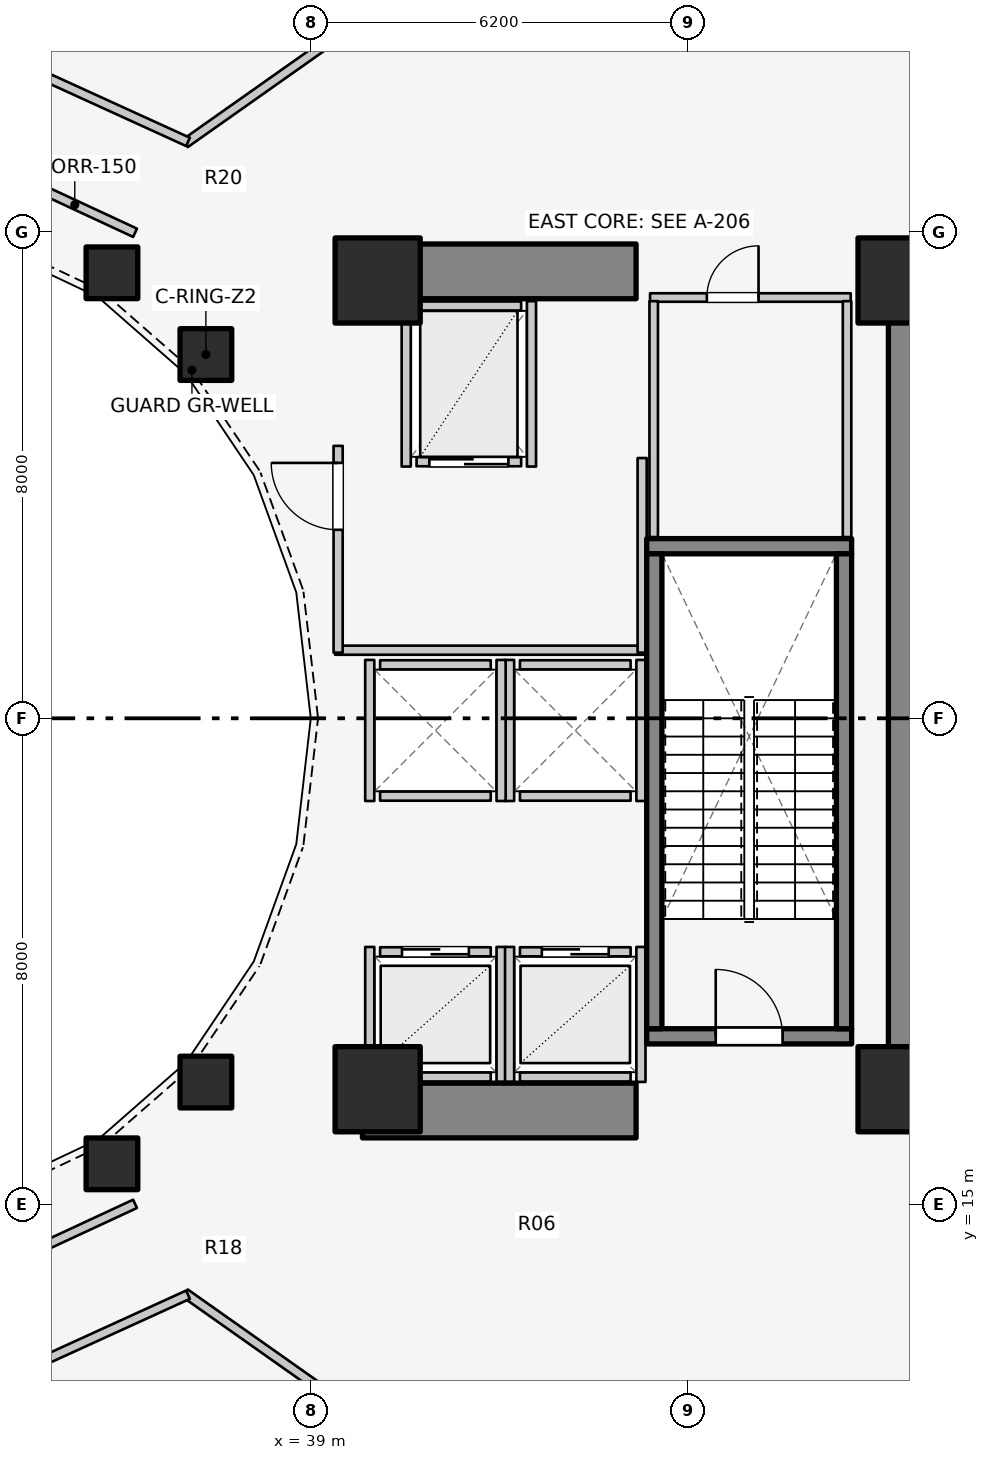
"""IFC4 building model, lengths in metres.
Left out: names, types, materials, properties, quantities, classifications, styles, units other than length and angle.
Written with IfcOpenShell. Run it as: python <this file> out.ifc"""

import sys

from ifc_helpers import new_model, si_unit, direction, frame, frame_2d, origin, origin_2d, place, context, subcontext, project, spatial, rectangle, extrude, element, fill, save


model = new_model("IFC4")
c1 = context("Model", 3, precision=1e-05, world=origin(), true_north=direction((0.0, 1.0)))
c2 = subcontext(c1, "Body", "Model", "MODEL_VIEW")
j1 = project(units=[si_unit("LENGTHUNIT", "METRE"), si_unit("PLANEANGLEUNIT", "RADIAN")], contexts=[c1])
p1 = place(None, origin())
s1 = spatial("IfcSite", under=j1, at=p1, CompositionType="ELEMENT")
p2 = place(p1, origin())
s2 = spatial("IfcBuilding", under=s1, at=p2, CompositionType="ELEMENT")
p3 = place(p2, frame((0.0, 0.0, 69.0)))
s3 = spatial("IfcBuildingStorey", under=s2, at=p3, CompositionType="ELEMENT", Elevation=69.0)
p4 = place(p3, frame((48.95, 17.05, 0.0), z_axis=(0.0, 0.0, 1.0), x_axis=(0.0, 1.0, 0.0)))
e1 = element("IfcWall", 1, at=p4, inside=s3, PredefinedType="SHEAR", context=c2, shape_type="SweptSolid", body=[
    extrude(rectangle(XDim=12.8, YDim=0.9, at=frame_2d((6.4, 0.0))), origin(), (0.0, 0.0, 1.0), 4.2),
])
for number, where, z_axis, x_axis in (
    (2, (39.85, 16.55, 0.0), (0.0, 0.0, 1.0), (1.0, 0.0, 0.0)),
    (3, (39.85, 30.35, 0.0), (0.0, 0.0, 1.0), (1.0, 0.0, 0.0)),
):
    element("IfcWall", number, at=place(p3, frame(where, z_axis=z_axis, x_axis=x_axis)), inside=s3, PredefinedType="SHEAR", context=c2, shape_type="SweptSolid", body=[
        extrude(rectangle(XDim=4.5, YDim=0.9, at=frame_2d((2.25, 0.0))), origin(), (0.0, 0.0, 1.0), 4.2),
    ])
p5 = place(p3, frame((44.525, 17.77, 0.0), z_axis=(0.0, 0.0, 1.0), x_axis=(1.0, 0.0, 0.0)))
e4 = element("IfcWall", 4, at=p5, inside=s3, PredefinedType="SOLIDWALL", context=c2, shape_type="SweptSolid", body=[
    extrude(rectangle(XDim=3.37, YDim=0.25, at=frame_2d((1.685, 0.0))), origin(), (0.0, 0.0, 1.0), 4.2),
])
p6 = place(p5, frame((1.135, 0.0, 0.0)))
e5 = element("IfcOpeningElement", 5, at=p6, cuts=e4, PredefinedType="OPENING", context=c2, shape_type="SweptSolid", body=[
    extrude(rectangle(XDim=1.1, YDim=2.1, at=frame_2d((0.55, 1.05))), frame((0.0, 0.135, 0.0), z_axis=(0.0, -1.0, 0.0), x_axis=(1.0, 0.0, 0.0)), (0.0, 0.0, 1.0), 0.27),
])
p7 = place(p3, frame((44.525, 25.83, 0.0), z_axis=(0.0, 0.0, 1.0), x_axis=(1.0, 0.0, 0.0)))
e6 = element("IfcWall", 6, at=p7, inside=s3, PredefinedType="SOLIDWALL", context=c2, shape_type="SweptSolid", body=[
    extrude(rectangle(XDim=3.37, YDim=0.25, at=frame_2d((1.685, 0.0))), origin(), (0.0, 0.0, 1.0), 4.2),
])
for number, where, z_axis, x_axis in (
    (7, (44.65, 17.895, 0.0), (0.0, 0.0, 1.0), (0.0, 1.0, 0.0)),
    (8, (47.77, 17.895, 0.0), (0.0, 0.0, 1.0), (0.0, 1.0, 0.0)),
):
    element("IfcWall", number, at=place(p3, frame(where, z_axis=z_axis, x_axis=x_axis)), inside=s3, PredefinedType="SOLIDWALL", context=c2, shape_type="SweptSolid", body=[
        extrude(rectangle(XDim=7.81, YDim=0.25, at=frame_2d((3.905, 0.0))), origin(), (0.0, 0.0, 1.0), 4.2),
    ])
for number, where, z_axis, x_axis in (
    (9, (40.1, 16.9, 0.0), (0.0, 0.0, 1.0), (1.0, 0.0, 0.0)),
    (10, (48.7, 16.9, 0.0), (0.0, 0.0, 1.0), (1.0, 0.0, 0.0)),
    (11, (48.7, 30.2, 0.0), (0.0, 0.0, 1.0), (1.0, 0.0, 0.0)),
    (12, (40.1, 30.2, 0.0), (0.0, 0.0, 1.0), (1.0, 0.0, 0.0)),
):
    element("IfcColumn", number, at=place(p3, frame(where, z_axis=z_axis, x_axis=x_axis)), inside=s3, PredefinedType="COLUMN", context=c2, shape_type="SweptSolid", body=[
        extrude(rectangle(XDim=1.4, YDim=1.4, at=origin_2d()), origin(), (0.0, 0.0, 1.0), 4.2),
    ])
for number, where, z_axis, x_axis in (
    (13, (37.275, 28.982, 0.0), (0.0, 0.0, 1.0), (1.0, 0.0, 0.0)),
    (14, (35.73, 30.327, 0.0), (0.0, 0.0, 1.0), (1.0, 0.0, 0.0)),
    (15, (35.73, 15.673, 0.0), (0.0, 0.0, 1.0), (1.0, 0.0, 0.0)),
    (16, (37.275, 17.018, 0.0), (0.0, 0.0, 1.0), (1.0, 0.0, 0.0)),
):
    element("IfcColumn", number, at=place(p3, frame(where, z_axis=z_axis, x_axis=x_axis)), inside=s3, PredefinedType="COLUMN", context=c2, shape_type="SweptSolid", body=[
        extrude(rectangle(XDim=0.85, YDim=0.85, at=origin_2d()), origin(), (0.0, 0.0, 1.0), 4.2),
    ])
p8 = place(p3, frame((40.14, 19.16, 0.0), z_axis=(0.0, 0.0, 1.0), x_axis=(1.0, 0.0, 0.0)))
e17 = element("IfcWall", 17, at=p8, inside=s3, PredefinedType="SOLIDWALL", context=c2, shape_type="SweptSolid", body=[
    extrude(rectangle(XDim=1.82, YDim=0.15, at=frame_2d((0.91, 0.0))), origin(), (0.0, 0.0, 1.0), 3.22),
])
p9 = place(p8, frame((0.36, 0.0, 0.0)))
e18 = element("IfcOpeningElement", 18, at=p9, cuts=e17, PredefinedType="OPENING", context=c2, shape_type="SweptSolid", body=[
    extrude(rectangle(XDim=1.1, YDim=2.1, at=frame_2d((0.55, 1.05))), frame((0.0, 0.085, 0.0), z_axis=(0.0, -1.0, 0.0), x_axis=(1.0, 0.0, 0.0)), (0.0, 0.0, 1.0), 0.17),
])
p10 = place(p3, frame((40.14, 17.1, 0.0), z_axis=(0.0, 0.0, 1.0), x_axis=(1.0, 0.0, 0.0)))
e19 = element("IfcWall", 19, at=p10, inside=s3, PredefinedType="SOLIDWALL", context=c2, shape_type="SweptSolid", body=[
    extrude(rectangle(XDim=1.82, YDim=0.15, at=frame_2d((0.91, 0.0))), origin(), (0.0, 0.0, 1.0), 3.22),
])
p11 = place(p3, frame((39.97, 17.02, 0.0), z_axis=(0.0, 0.0, 1.0), x_axis=(0.0, 1.0, 0.0)))
e20 = element("IfcWall", 20, at=p11, inside=s3, PredefinedType="SOLIDWALL", context=c2, shape_type="SweptSolid", body=[
    extrude(rectangle(XDim=2.22, YDim=0.15, at=frame_2d((1.11, 0.0))), origin(), (0.0, 0.0, 1.0), 2.973),
])
p12 = place(p3, frame((42.13, 17.02, 0.0), z_axis=(0.0, 0.0, 1.0), x_axis=(0.0, 1.0, 0.0)))
e21 = element("IfcWall", 21, at=p12, inside=s3, PredefinedType="SOLIDWALL", context=c2, shape_type="SweptSolid", body=[
    extrude(rectangle(XDim=2.22, YDim=0.15, at=frame_2d((1.11, 0.0))), origin(), (0.0, 0.0, 1.0), 3.675),
])
p13 = place(p3, frame((42.44, 19.16, 0.0), z_axis=(0.0, 0.0, 1.0), x_axis=(1.0, 0.0, 0.0)))
e22 = element("IfcWall", 22, at=p13, inside=s3, PredefinedType="SOLIDWALL", context=c2, shape_type="SweptSolid", body=[
    extrude(rectangle(XDim=1.82, YDim=0.15, at=frame_2d((0.91, 0.0))), origin(), (0.0, 0.0, 1.0), 3.675),
])
p14 = place(p13, frame((0.36, 0.0, 0.0)))
e23 = element("IfcOpeningElement", 23, at=p14, cuts=e22, PredefinedType="OPENING", context=c2, shape_type="SweptSolid", body=[
    extrude(rectangle(XDim=1.1, YDim=2.1, at=frame_2d((0.55, 1.05))), frame((0.0, 0.085, 0.0), z_axis=(0.0, -1.0, 0.0), x_axis=(1.0, 0.0, 0.0)), (0.0, 0.0, 1.0), 0.17),
])
p15 = place(p3, frame((42.44, 17.1, 0.0), z_axis=(0.0, 0.0, 1.0), x_axis=(1.0, 0.0, 0.0)))
e24 = element("IfcWall", 24, at=p15, inside=s3, PredefinedType="SOLIDWALL", context=c2, shape_type="SweptSolid", body=[
    extrude(rectangle(XDim=1.82, YDim=0.15, at=frame_2d((0.91, 0.0))), origin(), (0.0, 0.0, 1.0), 3.675),
])
p16 = place(p3, frame((42.27, 17.02, 0.0), z_axis=(0.0, 0.0, 1.0), x_axis=(0.0, 1.0, 0.0)))
e25 = element("IfcWall", 25, at=p16, inside=s3, PredefinedType="SOLIDWALL", context=c2, shape_type="SweptSolid", body=[
    extrude(rectangle(XDim=2.22, YDim=0.15, at=frame_2d((1.11, 0.0))), origin(), (0.0, 0.0, 1.0), 3.675),
])
p17 = place(p3, frame((44.43, 17.02, 0.0), z_axis=(0.0, 0.0, 1.0), x_axis=(0.0, 1.0, 0.0)))
e26 = element("IfcWall", 26, at=p17, inside=s3, PredefinedType="SOLIDWALL", context=c2, shape_type="SweptSolid", body=[
    extrude(rectangle(XDim=2.22, YDim=0.15, at=frame_2d((1.11, 0.0))), origin(), (0.0, 0.0, 1.0), 3.22),
])
for number, where, z_axis, x_axis in (
    (27, (42.44, 21.72, 0.0), (0.0, 0.0, 1.0), (1.0, 0.0, 0.0)),
    (28, (42.44, 23.88, 0.0), (0.0, 0.0, 1.0), (1.0, 0.0, 0.0)),
):
    element("IfcWall", number, at=place(p3, frame(where, z_axis=z_axis, x_axis=x_axis)), inside=s3, PredefinedType="SOLIDWALL", context=c2, shape_type="SweptSolid", body=[
        extrude(rectangle(XDim=1.82, YDim=0.15, at=frame_2d((0.91, 0.0))), origin(), (0.0, 0.0, 1.0), 3.675),
    ])
for number, where, z_axis, x_axis in (
    (29, (42.27, 21.64, 0.0), (0.0, 0.0, 1.0), (0.0, 1.0, 0.0)),
    (30, (44.43, 21.64, 0.0), (0.0, 0.0, 1.0), (0.0, 1.0, 0.0)),
):
    element("IfcWall", number, at=place(p3, frame(where, z_axis=z_axis, x_axis=x_axis)), inside=s3, PredefinedType="SOLIDWALL", context=c2, shape_type="SweptSolid", body=[
        extrude(rectangle(XDim=2.32, YDim=0.15, at=frame_2d((1.16, 0.0))), origin(), (0.0, 0.0, 1.0), 3.675),
    ])
for number, where, z_axis, x_axis in (
    (31, (40.14, 21.72, 0.0), (0.0, 0.0, 1.0), (1.0, 0.0, 0.0)),
    (32, (40.14, 23.88, 0.0), (0.0, 0.0, 1.0), (1.0, 0.0, 0.0)),
):
    element("IfcWall", number, at=place(p3, frame(where, z_axis=z_axis, x_axis=x_axis)), inside=s3, PredefinedType="SOLIDWALL", context=c2, shape_type="SweptSolid", body=[
        extrude(rectangle(XDim=1.82, YDim=0.15, at=frame_2d((0.91, 0.0))), origin(), (0.0, 0.0, 1.0), 3.22),
    ])
p18 = place(p3, frame((39.97, 21.64, 0.0), z_axis=(0.0, 0.0, 1.0), x_axis=(0.0, 1.0, 0.0)))
e33 = element("IfcWall", 33, at=p18, inside=s3, PredefinedType="SOLIDWALL", context=c2, shape_type="SweptSolid", body=[
    extrude(rectangle(XDim=2.32, YDim=0.15, at=frame_2d((1.16, 0.0))), origin(), (0.0, 0.0, 1.0), 3.22),
])
p19 = place(p3, frame((42.13, 21.64, 0.0), z_axis=(0.0, 0.0, 1.0), x_axis=(0.0, 1.0, 0.0)))
e34 = element("IfcWall", 34, at=p19, inside=s3, PredefinedType="SOLIDWALL", context=c2, shape_type="SweptSolid", body=[
    extrude(rectangle(XDim=2.32, YDim=0.15, at=frame_2d((1.16, 0.0))), origin(), (0.0, 0.0, 1.0), 3.675),
])
p20 = place(p3, frame((40.74, 27.22, 0.0), z_axis=(0.0, 0.0, 1.0), x_axis=(1.0, 0.0, 0.0)))
e35 = element("IfcWall", 35, at=p20, inside=s3, PredefinedType="SOLIDWALL", context=c2, shape_type="SweptSolid", body=[
    extrude(rectangle(XDim=1.72, YDim=0.15, at=frame_2d((0.86, 0.0))), origin(), (0.0, 0.0, 1.0), 3.675),
])
p21 = place(p20, frame((0.21, 0.0, 0.0)))
e36 = element("IfcOpeningElement", 36, at=p21, cuts=e35, PredefinedType="OPENING", context=c2, shape_type="SweptSolid", body=[
    extrude(rectangle(XDim=1.3, YDim=2.1, at=frame_2d((0.65, 1.05))), frame((0.0, 0.085, 0.0), z_axis=(0.0, -1.0, 0.0), x_axis=(1.0, 0.0, 0.0)), (0.0, 0.0, 1.0), 0.17),
])
p22 = place(p3, frame((40.74, 29.78, 0.0), z_axis=(0.0, 0.0, 1.0), x_axis=(1.0, 0.0, 0.0)))
e37 = element("IfcWall", 37, at=p22, inside=s3, PredefinedType="SOLIDWALL", context=c2, shape_type="SweptSolid", body=[
    extrude(rectangle(XDim=1.72, YDim=0.15, at=frame_2d((0.86, 0.0))), origin(), (0.0, 0.0, 1.0), 3.675),
])
for number, where, z_axis, x_axis in (
    (38, (40.57, 27.14, 0.0), (0.0, 0.0, 1.0), (0.0, 1.0, 0.0)),
    (39, (42.63, 27.14, 0.0), (0.0, 0.0, 1.0), (0.0, 1.0, 0.0)),
):
    element("IfcWall", number, at=place(p3, frame(where, z_axis=z_axis, x_axis=x_axis)), inside=s3, PredefinedType="SOLIDWALL", context=c2, shape_type="SweptSolid", body=[
        extrude(rectangle(XDim=2.72, YDim=0.15, at=frame_2d((1.36, 0.0))), origin(), (0.0, 0.0, 1.0), 3.675),
    ])
p23 = place(p3, frame((39.4, 24.12, 0.0), z_axis=(0.0, 0.0, 1.0), x_axis=(1.0, 0.0, 0.0)))
e40 = element("IfcWall", 40, at=p23, inside=s3, PredefinedType="PARTITIONING", context=c2, shape_type="SweptSolid", body=[
    extrude(rectangle(XDim=5.08, YDim=0.15, at=frame_2d((2.54, 0.0))), origin(), (0.0, 0.0, 1.0), 3.22),
])
p24 = place(p3, frame((44.45, 24.08, 0.0), z_axis=(0.0, 0.0, 1.0), x_axis=(0.0, 1.0, 0.0)))
e41 = element("IfcWall", 41, at=p24, inside=s3, PredefinedType="PARTITIONING", context=c2, shape_type="SweptSolid", body=[
    extrude(rectangle(XDim=3.2, YDim=0.15, at=frame_2d((1.6, 0.0))), origin(), (0.0, 0.0, 1.0), 3.675),
])
p25 = place(p3, frame((39.45, 24.08, 0.0), z_axis=(0.0, 0.0, 1.0), x_axis=(0.0, 1.0, 0.0)))
e42 = element("IfcWall", 42, at=p25, inside=s3, PredefinedType="PARTITIONING", context=c2, shape_type="SweptSolid", body=[
    extrude(rectangle(XDim=3.4, YDim=0.15, at=frame_2d((1.7, 0.0))), origin(), (0.0, 0.0, 1.0), 3.675),
])
p26 = place(p25, frame((2.02, 0.0, 0.0)))
e43 = element("IfcOpeningElement", 43, at=p26, cuts=e42, PredefinedType="OPENING", context=c2, shape_type="SweptSolid", body=[
    extrude(rectangle(XDim=1.1, YDim=2.1, at=frame_2d((0.55, 1.05))), frame((0.0, 0.085, 0.0), z_axis=(0.0, -1.0, 0.0), x_axis=(1.0, 0.0, 0.0)), (0.0, 0.0, 1.0), 0.17),
])
for number, where, z_axis, x_axis in (
    (44, (36.11, 30.985, 0.0), (0.0, 0.0, 1.0), (-0.907, 0.421, 0.0)),
    (45, (34.127, 14.094, 0.0), (0.0, 0.0, 1.0), (0.907, 0.421, 0.0)),
):
    element("IfcWall", number, at=place(p3, frame(where, z_axis=z_axis, x_axis=x_axis)), inside=s3, PredefinedType="PARTITIONING", context=c2, shape_type="SweptSolid", body=[
        extrude(rectangle(XDim=2.186, YDim=0.15, at=frame_2d((1.093, 0.0))), origin(), (0.0, 0.0, 1.0), 2.32),
    ])
p27 = place(p3, frame((36.934, 32.454, 0.0), z_axis=(0.0, 0.0, 1.0), x_axis=(0.817064271391, 0.576546595182, 0.0)))
e46 = element("IfcWall", 46, at=p27, inside=s3, PredefinedType="PARTITIONING", context=c2, shape_type="SweptSolid", body=[
    extrude(rectangle(XDim=9.614, YDim=0.15, at=frame_2d((4.807, 0.0))), origin(), (0.0, 0.0, 1.0), 2.32),
])
p28 = place(p3, frame((36.981, 32.479, 0.0), z_axis=(0.0, 0.0, 1.0), x_axis=(-0.909819048293, 0.415005179923, 0.0)))
e47 = element("IfcWall", 47, at=p28, inside=s3, PredefinedType="PARTITIONING", context=c2, shape_type="SweptSolid", body=[
    extrude(rectangle(XDim=2.646, YDim=0.15, at=frame_2d((1.323, 0.0))), origin(), (0.0, 0.0, 1.0), 2.32),
])
p29 = place(p3, frame((36.934, 13.546, 0.0), z_axis=(0.0, 0.0, 1.0), x_axis=(0.817064271391, -0.576546595182, 0.0)))
e48 = element("IfcWall", 48, at=p29, inside=s3, PredefinedType="PARTITIONING", context=c2, shape_type="SweptSolid", body=[
    extrude(rectangle(XDim=9.614, YDim=0.15, at=frame_2d((4.807, 0.0))), origin(), (0.0, 0.0, 1.0), 2.32),
])
p30 = place(p3, frame((34.573, 12.423, 0.0), z_axis=(0.0, 0.0, 1.0), x_axis=(0.909819048293, 0.415005179923, 0.0)))
e49 = element("IfcWall", 49, at=p30, inside=s3, PredefinedType="PARTITIONING", context=c2, shape_type="SweptSolid", body=[
    extrude(rectangle(XDim=2.646, YDim=0.15, at=frame_2d((1.323, 0.0))), origin(), (0.0, 0.0, 1.0), 2.32),
])
p31 = place(p3, frame((44.58, 29.92, 0.0), z_axis=(0.0, 0.0, 1.0), x_axis=(1.0, 0.0, 0.0)))
e50 = element("IfcWall", 50, at=p31, inside=s3, PredefinedType="PLUMBINGWALL", context=c2, shape_type="SweptSolid", body=[
    extrude(rectangle(XDim=3.3, YDim=0.14, at=frame_2d((1.65, 0.0))), origin(), (0.0, 0.0, 1.0), 3.675),
])
p32 = place(p31, frame((0.934, 0.0, 0.0)))
e51 = element("IfcOpeningElement", 51, at=p32, cuts=e50, PredefinedType="OPENING", context=c2, shape_type="SweptSolid", body=[
    extrude(rectangle(XDim=0.85, YDim=2.05, at=frame_2d((0.425, 1.025))), frame((0.0, 0.08, 0.0), z_axis=(0.0, -1.0, 0.0), x_axis=(1.0, 0.0, 0.0)), (0.0, 0.0, 1.0), 0.16),
])
for number, where, z_axis, x_axis in (
    (52, (44.64, 25.98, 0.0), (0.0, 0.0, 1.0), (0.0, 1.0, 0.0)),
    (53, (47.82, 25.98, 0.0), (0.0, 0.0, 1.0), (0.0, 1.0, 0.0)),
):
    element("IfcWall", number, at=place(p3, frame(where, z_axis=z_axis, x_axis=x_axis)), inside=s3, PredefinedType="PLUMBINGWALL", context=c2, shape_type="SweptSolid", body=[
        extrude(rectangle(XDim=3.88, YDim=0.14, at=frame_2d((1.94, 0.0))), origin(), (0.0, 0.0, 1.0), 3.675),
    ])
p33 = place(p6, origin())
e54 = element("IfcDoor", 54, at=p33, inside=s3, OperationType="SINGLE_SWING_LEFT", PredefinedType="DOOR", context=c2, shape_type="SweptSolid", body=[
    extrude(rectangle(XDim=1.1, YDim=2.1, at=frame_2d((0.55, 1.05))), frame((0.0, 0.025, 0.0), z_axis=(0.0, -1.0, 0.0), x_axis=(1.0, 0.0, 0.0)), (0.0, 0.0, 1.0), 0.05),
])
fill(e5, e54)
p34 = place(p9, origin())
e55 = element("IfcDoor", 55, at=p34, inside=s3, OperationType="DOUBLE_DOOR_SLIDING", PredefinedType="DOOR", context=c2, shape_type="SweptSolid", body=[
    extrude(rectangle(XDim=1.1, YDim=2.1, at=frame_2d((0.55, 1.05))), frame((0.0, 0.025, 0.0), z_axis=(0.0, -1.0, 0.0), x_axis=(1.0, 0.0, 0.0)), (0.0, 0.0, 1.0), 0.05),
])
fill(e18, e55)
p35 = place(p14, origin())
e56 = element("IfcDoor", 56, at=p35, inside=s3, OperationType="DOUBLE_DOOR_SLIDING", PredefinedType="DOOR", context=c2, shape_type="SweptSolid", body=[
    extrude(rectangle(XDim=1.1, YDim=2.1, at=frame_2d((0.55, 1.05))), frame((0.0, 0.025, 0.0), z_axis=(0.0, -1.0, 0.0), x_axis=(1.0, 0.0, 0.0)), (0.0, 0.0, 1.0), 0.05),
])
fill(e23, e56)
p36 = place(p21, origin())
e57 = element("IfcDoor", 57, at=p36, inside=s3, OperationType="DOUBLE_DOOR_SLIDING", PredefinedType="DOOR", context=c2, shape_type="SweptSolid", body=[
    extrude(rectangle(XDim=1.3, YDim=2.1, at=frame_2d((0.65, 1.05))), frame((0.0, 0.025, 0.0), z_axis=(0.0, -1.0, 0.0), x_axis=(1.0, 0.0, 0.0)), (0.0, 0.0, 1.0), 0.05),
])
fill(e36, e57)
p37 = place(p26, origin())
e58 = element("IfcDoor", 58, at=p37, inside=s3, OperationType="SINGLE_SWING_RIGHT", PredefinedType="DOOR", context=c2, shape_type="SweptSolid", body=[
    extrude(rectangle(XDim=1.1, YDim=2.1, at=frame_2d((0.55, 1.05))), frame((0.0, 0.025, 0.0), z_axis=(0.0, -1.0, 0.0), x_axis=(1.0, 0.0, 0.0)), (0.0, 0.0, 1.0), 0.05),
])
fill(e43, e58)
p38 = place(p32, origin())
e59 = element("IfcDoor", 59, at=p38, inside=s3, OperationType="SINGLE_SWING_RIGHT", PredefinedType="DOOR", context=c2, shape_type="SweptSolid", body=[
    extrude(rectangle(XDim=0.85, YDim=2.05, at=frame_2d((0.425, 1.025))), frame((0.0, 0.025, 0.0), z_axis=(0.0, -1.0, 0.0), x_axis=(1.0, 0.0, 0.0)), (0.0, 0.0, 1.0), 0.05),
])
fill(e51, e59)
save(model, sys.argv[1])
